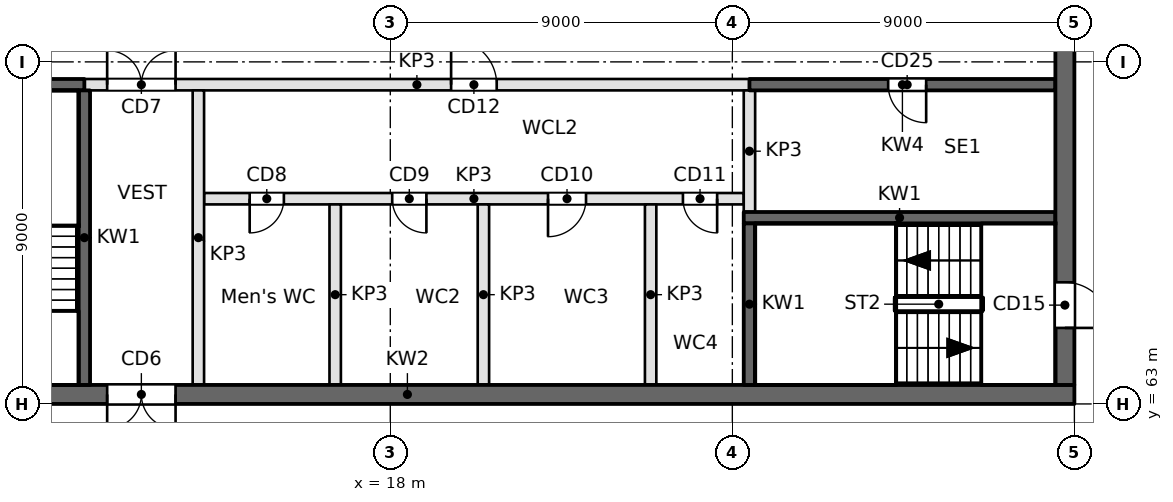
"""IFC4 building model, lengths in metres.
Left out: names, types, materials, properties, quantities, classifications, styles, units other than length and angle.
Written with IfcOpenShell. Run it as: python <this file> out.ifc"""

import sys

from ifc_helpers import new_model, si_unit, direction, frame, frame_2d, origin, place, context, subcontext, project, spatial, rectangle, extrude, element, fill, save


model = new_model("IFC4")
c1 = context("Model", 3, precision=1e-05, world=origin(), true_north=direction((0.0, 1.0)))
c2 = subcontext(c1, "Body", "Model", "MODEL_VIEW")
j1 = project(units=[si_unit("LENGTHUNIT", "METRE"), si_unit("PLANEANGLEUNIT", "RADIAN")], contexts=[c1])
p1 = place(None, origin())
s1 = spatial("IfcSite", under=j1, at=p1, CompositionType="ELEMENT")
p2 = place(p1, origin())
s2 = spatial("IfcBuilding", under=s1, at=p2, CompositionType="ELEMENT")
p3 = place(p2, frame((0.0, 0.0, -6.0)))
s3 = spatial("IfcBuildingStorey", under=s2, at=p3, CompositionType="ELEMENT", Elevation=-6.0)
p4 = place(p3, frame((0.9, 63.25, 0.0), z_axis=(0.0, 0.0, 1.0), x_axis=(1.0, 0.0, 0.0)))
e1 = element("IfcWall", 1, at=p4, inside=s3, PredefinedType="SOLIDWALL", context=c2, shape_type="SweptSolid", body=[
    extrude(rectangle(XDim=35.1, YDim=0.5, at=frame_2d((17.55, 0.0))), origin(), (0.0, 0.0, 1.0), 5.6),
])
p5 = place(p4, frame((9.65, 0.0, 0.0)))
e2 = element("IfcOpeningElement", 2, at=p5, cuts=e1, PredefinedType="OPENING", context=c2, shape_type="SweptSolid", body=[
    extrude(rectangle(XDim=1.8, YDim=2.1, at=frame_2d((0.9, 1.05))), frame((0.0, 0.25, 0.0), z_axis=(0.0, -1.0, 0.0), x_axis=(1.0, 0.0, 0.0)), (0.0, 0.0, 1.0), 0.5),
])
p6 = place(p4, frame((1.55, 0.0, 0.0)))
e3 = element("IfcOpeningElement", 3, at=p6, cuts=e1, PredefinedType="OPENING", context=c2, shape_type="SweptSolid", body=[
    extrude(rectangle(XDim=1.2, YDim=2.1, at=frame_2d((0.6, 1.05))), frame((0.0, 0.25, 0.0), z_axis=(0.0, -1.0, 0.0), x_axis=(1.0, 0.0, 0.0)), (0.0, 0.0, 1.0), 0.5),
])
p7 = place(p4, frame((6.15, 0.0, 0.0)))
e4 = element("IfcOpeningElement", 4, at=p7, cuts=e1, PredefinedType="OPENING", context=c2, shape_type="SweptSolid", body=[
    extrude(rectangle(XDim=1.2, YDim=2.1, at=frame_2d((0.6, 1.05))), frame((0.0, 0.25, 0.0), z_axis=(0.0, -1.0, 0.0), x_axis=(1.0, 0.0, 0.0)), (0.0, 0.0, 1.0), 0.5),
])
p8 = place(p3, frame((27.3, 67.9, 0.0), z_axis=(0.0, 0.0, 1.0), x_axis=(1.0, 0.0, 0.0)))
e5 = element("IfcWall", 5, at=p8, inside=s3, PredefinedType="SOLIDWALL", context=c2, shape_type="SweptSolid", body=[
    extrude(rectangle(XDim=8.2, YDim=0.3, at=frame_2d((4.1, 0.0))), origin(), (0.0, 0.0, 1.0), 5.6),
])
p9 = place(p3, frame((13.1, 68.4, 0.0), z_axis=(0.0, 0.0, 1.0), x_axis=(1.0, 0.0, 0.0)))
e6 = element("IfcWall", 6, at=p9, inside=s3, PredefinedType="PARTITIONING", context=c2, shape_type="SweptSolid", body=[
    extrude(rectangle(XDim=14.2, YDim=0.3, at=frame_2d((7.1, 0.0))), origin(), (0.0, 0.0, 1.0), 5.6),
])
p10 = place(p9, frame((1.2, 0.0, 0.0)))
e7 = element("IfcOpeningElement", 7, at=p10, cuts=e6, PredefinedType="OPENING", context=c2, shape_type="SweptSolid", body=[
    extrude(rectangle(XDim=0.9, YDim=2.1, at=frame_2d((0.45, 1.05))), frame((0.0, 0.15, 0.0), z_axis=(0.0, -1.0, 0.0), x_axis=(1.0, 0.0, 0.0)), (0.0, 0.0, 1.0), 0.3),
])
p11 = place(p9, frame((4.95, 0.0, 0.0)))
e8 = element("IfcOpeningElement", 8, at=p11, cuts=e6, PredefinedType="OPENING", context=c2, shape_type="SweptSolid", body=[
    extrude(rectangle(XDim=0.9, YDim=2.1, at=frame_2d((0.45, 1.05))), frame((0.0, 0.15, 0.0), z_axis=(0.0, -1.0, 0.0), x_axis=(1.0, 0.0, 0.0)), (0.0, 0.0, 1.0), 0.3),
])
p12 = place(p9, frame((9.05, 0.0, 0.0)))
e9 = element("IfcOpeningElement", 9, at=p12, cuts=e6, PredefinedType="OPENING", context=c2, shape_type="SweptSolid", body=[
    extrude(rectangle(XDim=1.0, YDim=2.1, at=frame_2d((0.5, 1.05))), frame((0.0, 0.15, 0.0), z_axis=(0.0, -1.0, 0.0), x_axis=(1.0, 0.0, 0.0)), (0.0, 0.0, 1.0), 0.3),
])
p13 = place(p9, frame((12.6, 0.0, 0.0)))
e10 = element("IfcOpeningElement", 10, at=p13, cuts=e6, PredefinedType="OPENING", context=c2, shape_type="SweptSolid", body=[
    extrude(rectangle(XDim=0.9, YDim=2.1, at=frame_2d((0.45, 1.05))), frame((0.0, 0.15, 0.0), z_axis=(0.0, -1.0, 0.0), x_axis=(1.0, 0.0, 0.0)), (0.0, 0.0, 1.0), 0.3),
])
p14 = place(p3, frame((0.9, 71.4, 0.0), z_axis=(0.0, 0.0, 1.0), x_axis=(1.0, 0.0, 0.0)))
e11 = element("IfcWall", 11, at=p14, inside=s3, PredefinedType="SOLIDWALL", context=c2, shape_type="SweptSolid", body=[
    extrude(rectangle(XDim=9.05, YDim=0.3, at=frame_2d((4.525, 0.0))), origin(), (0.0, 0.0, 1.0), 5.6),
])
p15 = place(p3, frame((9.95, 71.4, 0.0), z_axis=(0.0, 0.0, 1.0), x_axis=(1.0, 0.0, 0.0)))
e12 = element("IfcWall", 12, at=p15, inside=s3, PredefinedType="PARTITIONING", context=c2, shape_type="SweptSolid", body=[
    extrude(rectangle(XDim=17.5, YDim=0.3, at=frame_2d((8.75, 0.0))), origin(), (0.0, 0.0, 1.0), 5.6),
])
p16 = place(p15, frame((0.6, 0.0, 0.0)))
e13 = element("IfcOpeningElement", 13, at=p16, cuts=e12, PredefinedType="OPENING", context=c2, shape_type="SweptSolid", body=[
    extrude(rectangle(XDim=1.8, YDim=2.1, at=frame_2d((0.9, 1.05))), frame((0.0, 0.15, 0.0), z_axis=(0.0, -1.0, 0.0), x_axis=(1.0, 0.0, 0.0)), (0.0, 0.0, 1.0), 0.3),
])
p17 = place(p15, frame((9.65, 0.0, 0.0)))
e14 = element("IfcOpeningElement", 14, at=p17, cuts=e12, PredefinedType="OPENING", context=c2, shape_type="SweptSolid", body=[
    extrude(rectangle(XDim=1.2, YDim=2.1, at=frame_2d((0.6, 1.05))), frame((0.0, 0.15, 0.0), z_axis=(0.0, -1.0, 0.0), x_axis=(1.0, 0.0, 0.0)), (0.0, 0.0, 1.0), 0.3),
])
p18 = place(p3, frame((27.45, 71.4, 0.0), z_axis=(0.0, 0.0, 1.0), x_axis=(1.0, 0.0, 0.0)))
e15 = element("IfcWall", 15, at=p18, inside=s3, PredefinedType="SOLIDWALL", context=c2, shape_type="SweptSolid", body=[
    extrude(rectangle(XDim=8.05, YDim=0.3, at=frame_2d((4.025, 0.0))), origin(), (0.0, 0.0, 1.0), 5.6),
])
p19 = place(p18, frame((3.65, 0.0, 0.0)))
e16 = element("IfcOpeningElement", 16, at=p19, cuts=e15, PredefinedType="OPENING", context=c2, shape_type="SweptSolid", body=[
    extrude(rectangle(XDim=1.0, YDim=2.1, at=frame_2d((0.5, 1.05))), frame((0.0, 0.15, 0.0), z_axis=(0.0, -1.0, 0.0), x_axis=(1.0, 0.0, 0.0)), (0.0, 0.0, 1.0), 0.3),
])
p20 = place(p3, frame((9.95, 63.5, 0.0), z_axis=(0.0, 0.0, 1.0), x_axis=(0.0, 1.0, 0.0)))
e17 = element("IfcWall", 17, at=p20, inside=s3, PredefinedType="SOLIDWALL", context=c2, shape_type="SweptSolid", body=[
    extrude(rectangle(XDim=7.75, YDim=0.3, at=frame_2d((3.875, 0.0))), origin(), (0.0, 0.0, 1.0), 5.6),
])
p21 = place(p3, frame((12.95, 63.5, 0.0), z_axis=(0.0, 0.0, 1.0), x_axis=(0.0, 1.0, 0.0)))
e18 = element("IfcWall", 18, at=p21, inside=s3, PredefinedType="PARTITIONING", context=c2, shape_type="SweptSolid", body=[
    extrude(rectangle(XDim=7.75, YDim=0.3, at=frame_2d((3.875, 0.0))), origin(), (0.0, 0.0, 1.0), 5.6),
])
for number, where, z_axis, x_axis in (
    (19, (16.55, 63.5, 0.0), (0.0, 0.0, 1.0), (0.0, 1.0, 0.0)),
    (20, (20.45, 63.5, 0.0), (0.0, 0.0, 1.0), (0.0, 1.0, 0.0)),
    (21, (24.85, 63.5, 0.0), (0.0, 0.0, 1.0), (0.0, 1.0, 0.0)),
):
    element("IfcWall", number, at=place(p3, frame(where, z_axis=z_axis, x_axis=x_axis)), inside=s3, PredefinedType="PARTITIONING", context=c2, shape_type="SweptSolid", body=[
        extrude(rectangle(XDim=4.75, YDim=0.3, at=frame_2d((2.375, 0.0))), origin(), (0.0, 0.0, 1.0), 5.6),
    ])
p22 = place(p3, frame((27.45, 63.5, 0.0), z_axis=(0.0, 0.0, 1.0), x_axis=(0.0, 1.0, 0.0)))
e22 = element("IfcWall", 22, at=p22, inside=s3, PredefinedType="SOLIDWALL", context=c2, shape_type="SweptSolid", body=[
    extrude(rectangle(XDim=4.25, YDim=0.3, at=frame_2d((2.125, 0.0))), origin(), (0.0, 0.0, 1.0), 5.6),
])
p23 = place(p3, frame((27.45, 68.05, 0.0), z_axis=(0.0, 0.0, 1.0), x_axis=(0.0, 1.0, 0.0)))
e23 = element("IfcWall", 23, at=p23, inside=s3, PredefinedType="PARTITIONING", context=c2, shape_type="SweptSolid", body=[
    extrude(rectangle(XDim=3.2, YDim=0.3, at=frame_2d((1.6, 0.0))), origin(), (0.0, 0.0, 1.0), 5.6),
])
p24 = place(p3, frame((35.75, 63.5, 0.0), z_axis=(0.0, 0.0, 1.0), x_axis=(0.0, 1.0, 0.0)))
e24 = element("IfcWall", 24, at=p24, inside=s3, PredefinedType="SOLIDWALL", context=c2, shape_type="SweptSolid", body=[
    extrude(rectangle(XDim=34.6, YDim=0.5, at=frame_2d((17.3, 0.0))), origin(), (0.0, 0.0, 1.0), 5.6),
])
p25 = place(p24, frame((9.7, 0.0, 0.0)))
e25 = element("IfcOpeningElement", 25, at=p25, cuts=e24, PredefinedType="OPENING", context=c2, shape_type="SweptSolid", body=[
    extrude(rectangle(XDim=2.4, YDim=2.1, at=frame_2d((1.2, 1.05))), frame((0.0, 0.25, 0.0), z_axis=(0.0, -1.0, 0.0), x_axis=(1.0, 0.0, 0.0)), (0.0, 0.0, 1.0), 0.5),
])
p26 = place(p24, frame((27.9, 0.0, 0.0)))
e26 = element("IfcOpeningElement", 26, at=p26, cuts=e24, PredefinedType="OPENING", context=c2, shape_type="SweptSolid", body=[
    extrude(rectangle(XDim=1.5, YDim=2.1, at=frame_2d((0.75, 1.05))), frame((0.0, 0.25, 0.0), z_axis=(0.0, -1.0, 0.0), x_axis=(1.0, 0.0, 0.0)), (0.0, 0.0, 1.0), 0.5),
])
p27 = place(p24, frame((1.5, 0.0, 0.0)))
e27 = element("IfcOpeningElement", 27, at=p27, cuts=e24, PredefinedType="OPENING", context=c2, shape_type="SweptSolid", body=[
    extrude(rectangle(XDim=1.2, YDim=2.1, at=frame_2d((0.6, 1.05))), frame((0.0, 0.25, 0.0), z_axis=(0.0, -1.0, 0.0), x_axis=(1.0, 0.0, 0.0)), (0.0, 0.0, 1.0), 0.5),
])
p28 = place(p5, frame((1.8, 0.0, 0.0), z_axis=(0.0, 0.0, 1.0), x_axis=(-1.0, 0.0, 0.0)))
e28 = element("IfcDoor", 28, at=p28, inside=s3, OperationType="DOUBLE_DOOR_SINGLE_SWING", PredefinedType="DOOR", context=c2, shape_type="SweptSolid", body=[
    extrude(rectangle(XDim=1.8, YDim=2.1, at=frame_2d((0.9, 1.05))), frame((0.0, 0.025, 0.0), z_axis=(0.0, -1.0, 0.0), x_axis=(1.0, 0.0, 0.0)), (0.0, 0.0, 1.0), 0.05),
])
fill(e2, e28)
p29 = place(p16, origin())
e29 = element("IfcDoor", 29, at=p29, inside=s3, OperationType="DOUBLE_DOOR_SINGLE_SWING", PredefinedType="DOOR", context=c2, shape_type="SweptSolid", body=[
    extrude(rectangle(XDim=1.8, YDim=2.1, at=frame_2d((0.9, 1.05))), frame((0.0, 0.025, 0.0), z_axis=(0.0, -1.0, 0.0), x_axis=(1.0, 0.0, 0.0)), (0.0, 0.0, 1.0), 0.05),
])
fill(e13, e29)
p30 = place(p10, frame((0.9, 0.0, 0.0), z_axis=(0.0, 0.0, 1.0), x_axis=(-1.0, 0.0, 0.0)))
e30 = element("IfcDoor", 30, at=p30, inside=s3, OperationType="SINGLE_SWING_RIGHT", PredefinedType="DOOR", context=c2, shape_type="SweptSolid", body=[
    extrude(rectangle(XDim=0.9, YDim=2.1, at=frame_2d((0.45, 1.05))), frame((0.0, 0.025, 0.0), z_axis=(0.0, -1.0, 0.0), x_axis=(1.0, 0.0, 0.0)), (0.0, 0.0, 1.0), 0.05),
])
fill(e7, e30)
p31 = place(p11, frame((0.9, 0.0, 0.0), z_axis=(0.0, 0.0, 1.0), x_axis=(-1.0, 0.0, 0.0)))
e31 = element("IfcDoor", 31, at=p31, inside=s3, OperationType="SINGLE_SWING_LEFT", PredefinedType="DOOR", context=c2, shape_type="SweptSolid", body=[
    extrude(rectangle(XDim=0.9, YDim=2.1, at=frame_2d((0.45, 1.05))), frame((0.0, 0.025, 0.0), z_axis=(0.0, -1.0, 0.0), x_axis=(1.0, 0.0, 0.0)), (0.0, 0.0, 1.0), 0.05),
])
fill(e8, e31)
p32 = place(p12, frame((1.0, 0.0, 0.0), z_axis=(0.0, 0.0, 1.0), x_axis=(-1.0, 0.0, 0.0)))
e32 = element("IfcDoor", 32, at=p32, inside=s3, OperationType="SINGLE_SWING_RIGHT", PredefinedType="DOOR", context=c2, shape_type="SweptSolid", body=[
    extrude(rectangle(XDim=1.0, YDim=2.1, at=frame_2d((0.5, 1.05))), frame((0.0, 0.025, 0.0), z_axis=(0.0, -1.0, 0.0), x_axis=(1.0, 0.0, 0.0)), (0.0, 0.0, 1.0), 0.05),
])
fill(e9, e32)
p33 = place(p13, frame((0.9, 0.0, 0.0), z_axis=(0.0, 0.0, 1.0), x_axis=(-1.0, 0.0, 0.0)))
e33 = element("IfcDoor", 33, at=p33, inside=s3, OperationType="SINGLE_SWING_LEFT", PredefinedType="DOOR", context=c2, shape_type="SweptSolid", body=[
    extrude(rectangle(XDim=0.9, YDim=2.1, at=frame_2d((0.45, 1.05))), frame((0.0, 0.025, 0.0), z_axis=(0.0, -1.0, 0.0), x_axis=(1.0, 0.0, 0.0)), (0.0, 0.0, 1.0), 0.05),
])
fill(e10, e33)
p34 = place(p17, origin())
e34 = element("IfcDoor", 34, at=p34, inside=s3, OperationType="SINGLE_SWING_LEFT", PredefinedType="DOOR", context=c2, shape_type="SweptSolid", body=[
    extrude(rectangle(XDim=1.2, YDim=2.1, at=frame_2d((0.6, 1.05))), frame((0.0, 0.025, 0.0), z_axis=(0.0, -1.0, 0.0), x_axis=(1.0, 0.0, 0.0)), (0.0, 0.0, 1.0), 0.05),
])
fill(e14, e34)
p35 = place(p27, frame((1.2, 0.0, 0.0), z_axis=(0.0, 0.0, 1.0), x_axis=(-1.0, 0.0, 0.0)))
e35 = element("IfcDoor", 35, at=p35, inside=s3, OperationType="SINGLE_SWING_RIGHT", PredefinedType="DOOR", context=c2, shape_type="SweptSolid", body=[
    extrude(rectangle(XDim=1.2, YDim=2.1, at=frame_2d((0.6, 1.05))), frame((0.0, 0.025, 0.0), z_axis=(0.0, -1.0, 0.0), x_axis=(1.0, 0.0, 0.0)), (0.0, 0.0, 1.0), 0.05),
])
fill(e27, e35)
p36 = place(p19, frame((1.0, 0.0, 0.0), z_axis=(0.0, 0.0, 1.0), x_axis=(-1.0, 0.0, 0.0)))
e36 = element("IfcDoor", 36, at=p36, inside=s3, OperationType="SINGLE_SWING_LEFT", PredefinedType="DOOR", context=c2, shape_type="SweptSolid", body=[
    extrude(rectangle(XDim=1.0, YDim=2.1, at=frame_2d((0.5, 1.05))), frame((0.0, 0.025, 0.0), z_axis=(0.0, -1.0, 0.0), x_axis=(1.0, 0.0, 0.0)), (0.0, 0.0, 1.0), 0.05),
])
fill(e16, e36)
save(model, sys.argv[1])
